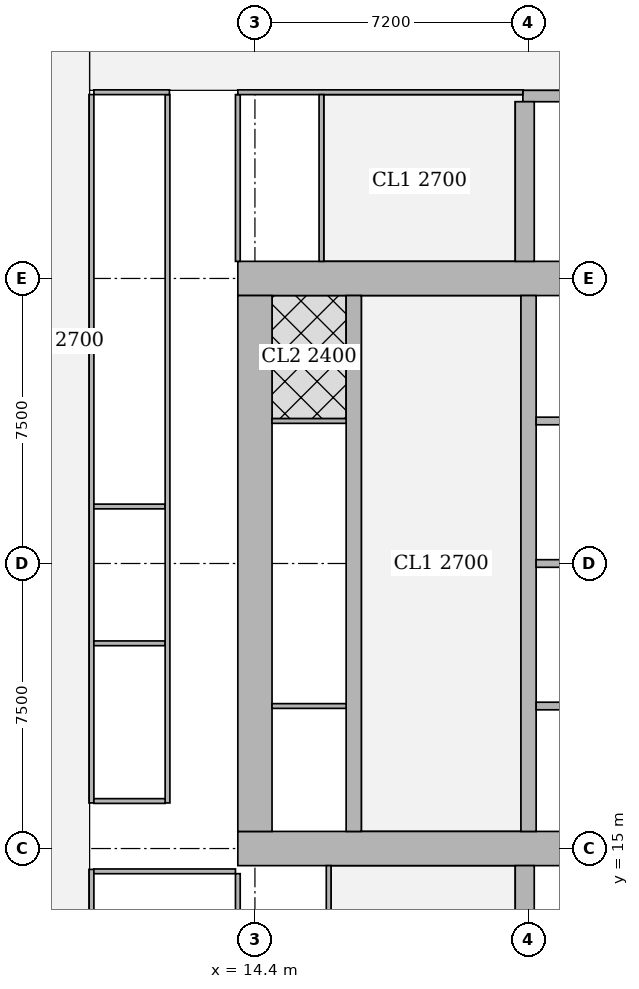
"""IFC4 building model, lengths in metres.
Left out: names, types, materials, properties, quantities, classifications, styles, units other than length and angle.
Written with IfcOpenShell. Run it as: python <this file> out.ifc"""

import sys

from ifc_helpers import new_model, si_unit, direction, frame, frame_2d, origin, place, context, subcontext, project, spatial, rectangle, extrude, element, fill, save


model = new_model("IFC4")
c1 = context("Model", 3, precision=1e-05, world=origin(), true_north=direction((0.0, 1.0)))
c2 = subcontext(c1, "Body", "Model", "MODEL_VIEW")
j1 = project(units=[si_unit("LENGTHUNIT", "METRE"), si_unit("PLANEANGLEUNIT", "RADIAN")], contexts=[c1])
p1 = place(None, origin())
s1 = spatial("IfcSite", under=j1, at=p1, CompositionType="ELEMENT")
p2 = place(p1, origin())
s2 = spatial("IfcBuilding", under=s1, at=p2, CompositionType="ELEMENT")
p3 = place(p2, frame((0.0, 0.0, 147.05)))
s3 = spatial("IfcBuildingStorey", under=s2, at=p3, CompositionType="ELEMENT", Elevation=147.05)
p4 = place(p3, frame((13.95, 15.0, 0.0), z_axis=(0.0, 0.0, 1.0), x_axis=(1.0, 0.0, 0.0)))
e1 = element("IfcWall", 1, at=p4, inside=s3, PredefinedType="SHEAR", context=c2, shape_type="SweptSolid", body=[
    extrude(rectangle(XDim=15.3, YDim=0.9, at=frame_2d((7.65, 0.0))), origin(), (0.0, 0.0, 1.0), 3.75),
])
p5 = place(p4, frame((4.45, 0.0, 0.0)))
e2 = element("IfcOpeningElement", 2, at=p5, cuts=e1, PredefinedType="OPENING", context=c2, shape_type="SweptSolid", body=[
    extrude(rectangle(XDim=1.8, YDim=2.1, at=frame_2d((0.9, 1.05))), frame((0.0, 0.46, 0.0), z_axis=(0.0, -1.0, 0.0), x_axis=(1.0, 0.0, 0.0)), (0.0, 0.0, 1.0), 0.92),
])
p6 = place(p4, frame((10.7, 0.0, 0.0)))
e3 = element("IfcOpeningElement", 3, at=p6, cuts=e1, PredefinedType="OPENING", context=c2, shape_type="SweptSolid", body=[
    extrude(rectangle(XDim=1.1, YDim=2.1, at=frame_2d((0.55, 1.05))), frame((0.0, 0.46, 0.0), z_axis=(0.0, -1.0, 0.0), x_axis=(1.0, 0.0, 0.0)), (0.0, 0.0, 1.0), 0.92),
])
p7 = place(p3, frame((13.95, 30.0, 0.0), z_axis=(0.0, 0.0, 1.0), x_axis=(1.0, 0.0, 0.0)))
e4 = element("IfcWall", 4, at=p7, inside=s3, PredefinedType="SHEAR", context=c2, shape_type="SweptSolid", body=[
    extrude(rectangle(XDim=15.3, YDim=0.9, at=frame_2d((7.65, 0.0))), origin(), (0.0, 0.0, 1.0), 3.75),
])
p8 = place(p7, frame((4.45, 0.0, 0.0)))
e5 = element("IfcOpeningElement", 5, at=p8, cuts=e4, PredefinedType="OPENING", context=c2, shape_type="SweptSolid", body=[
    extrude(rectangle(XDim=1.8, YDim=2.1, at=frame_2d((0.9, 1.05))), frame((0.0, 0.46, 0.0), z_axis=(0.0, -1.0, 0.0), x_axis=(1.0, 0.0, 0.0)), (0.0, 0.0, 1.0), 0.92),
])
p9 = place(p7, frame((10.7, 0.0, 0.0)))
e6 = element("IfcOpeningElement", 6, at=p9, cuts=e4, PredefinedType="OPENING", context=c2, shape_type="SweptSolid", body=[
    extrude(rectangle(XDim=1.1, YDim=2.1, at=frame_2d((0.55, 1.05))), frame((0.0, 0.46, 0.0), z_axis=(0.0, -1.0, 0.0), x_axis=(1.0, 0.0, 0.0)), (0.0, 0.0, 1.0), 0.92),
])
p10 = place(p3, frame((14.4, 15.45, 0.0), z_axis=(0.0, 0.0, 1.0), x_axis=(0.0, 1.0, 0.0)))
e7 = element("IfcWall", 7, at=p10, inside=s3, PredefinedType="SHEAR", context=c2, shape_type="SweptSolid", body=[
    extrude(rectangle(XDim=14.1, YDim=0.9, at=frame_2d((7.05, 0.0))), origin(), (0.0, 0.0, 1.0), 3.75),
])
p11 = place(p3, frame((17.0, 15.45, 0.0), z_axis=(0.0, 0.0, 1.0), x_axis=(0.0, 1.0, 0.0)))
e8 = element("IfcWall", 8, at=p11, inside=s3, PredefinedType="SHEAR", context=c2, shape_type="SweptSolid", body=[
    extrude(rectangle(XDim=14.1, YDim=0.4, at=frame_2d((7.05, 0.0))), origin(), (0.0, 0.0, 1.0), 3.75),
])
p12 = place(p11, frame((0.925, 0.0, 0.0)))
e9 = element("IfcOpeningElement", 9, at=p12, cuts=e8, PredefinedType="OPENING", context=c2, shape_type="SweptSolid", body=[
    extrude(rectangle(XDim=1.0, YDim=2.1, at=frame_2d((0.5, 1.05))), frame((0.0, 0.21, 0.0), z_axis=(0.0, -1.0, 0.0), x_axis=(1.0, 0.0, 0.0)), (0.0, 0.0, 1.0), 0.42),
])
p13 = place(p11, frame((4.675, 0.0, 0.0)))
e10 = element("IfcOpeningElement", 10, at=p13, cuts=e8, PredefinedType="OPENING", context=c2, shape_type="SweptSolid", body=[
    extrude(rectangle(XDim=1.0, YDim=2.1, at=frame_2d((0.5, 1.05))), frame((0.0, 0.21, 0.0), z_axis=(0.0, -1.0, 0.0), x_axis=(1.0, 0.0, 0.0)), (0.0, 0.0, 1.0), 0.42),
])
p14 = place(p11, frame((8.425, 0.0, 0.0)))
e11 = element("IfcOpeningElement", 11, at=p14, cuts=e8, PredefinedType="OPENING", context=c2, shape_type="SweptSolid", body=[
    extrude(rectangle(XDim=1.0, YDim=2.1, at=frame_2d((0.5, 1.05))), frame((0.0, 0.21, 0.0), z_axis=(0.0, -1.0, 0.0), x_axis=(1.0, 0.0, 0.0)), (0.0, 0.0, 1.0), 0.42),
])
p15 = place(p11, frame((12.175, 0.0, 0.0)))
e12 = element("IfcOpeningElement", 12, at=p15, cuts=e8, PredefinedType="OPENING", context=c2, shape_type="SweptSolid", body=[
    extrude(rectangle(XDim=1.0, YDim=2.1, at=frame_2d((0.5, 1.05))), frame((0.0, 0.21, 0.0), z_axis=(0.0, -1.0, 0.0), x_axis=(1.0, 0.0, 0.0)), (0.0, 0.0, 1.0), 0.42),
])
p16 = place(p3, frame((21.6, 15.45, 0.0), z_axis=(0.0, 0.0, 1.0), x_axis=(0.0, 1.0, 0.0)))
e13 = element("IfcWall", 13, at=p16, inside=s3, PredefinedType="SHEAR", context=c2, shape_type="SweptSolid", body=[
    extrude(rectangle(XDim=14.1, YDim=0.4, at=frame_2d((7.05, 0.0))), origin(), (0.0, 0.0, 1.0), 3.75),
])
p17 = place(p16, frame((0.875, 0.0, 0.0)))
e14 = element("IfcOpeningElement", 14, at=p17, cuts=e13, PredefinedType="OPENING", context=c2, shape_type="SweptSolid", body=[
    extrude(rectangle(XDim=1.1, YDim=2.1, at=frame_2d((0.55, 1.05))), frame((0.0, 0.21, 0.0), z_axis=(0.0, -1.0, 0.0), x_axis=(1.0, 0.0, 0.0)), (0.0, 0.0, 1.0), 0.42),
])
p18 = place(p16, frame((4.625, 0.0, 0.0)))
e15 = element("IfcOpeningElement", 15, at=p18, cuts=e13, PredefinedType="OPENING", context=c2, shape_type="SweptSolid", body=[
    extrude(rectangle(XDim=1.1, YDim=2.1, at=frame_2d((0.55, 1.05))), frame((0.0, 0.21, 0.0), z_axis=(0.0, -1.0, 0.0), x_axis=(1.0, 0.0, 0.0)), (0.0, 0.0, 1.0), 0.42),
])
p19 = place(p16, frame((8.375, 0.0, 0.0)))
e16 = element("IfcOpeningElement", 16, at=p19, cuts=e13, PredefinedType="OPENING", context=c2, shape_type="SweptSolid", body=[
    extrude(rectangle(XDim=1.1, YDim=2.1, at=frame_2d((0.55, 1.05))), frame((0.0, 0.21, 0.0), z_axis=(0.0, -1.0, 0.0), x_axis=(1.0, 0.0, 0.0)), (0.0, 0.0, 1.0), 0.42),
])
p20 = place(p16, frame((12.125, 0.0, 0.0)))
e17 = element("IfcOpeningElement", 17, at=p20, cuts=e13, PredefinedType="OPENING", context=c2, shape_type="SweptSolid", body=[
    extrude(rectangle(XDim=1.1, YDim=2.1, at=frame_2d((0.55, 1.05))), frame((0.0, 0.21, 0.0), z_axis=(0.0, -1.0, 0.0), x_axis=(1.0, 0.0, 0.0)), (0.0, 0.0, 1.0), 0.42),
])
p21 = place(p3, frame((21.5, 10.35, 0.0), z_axis=(0.0, 0.0, 1.0), x_axis=(0.0, 1.0, 0.0)))
e18 = element("IfcWall", 18, at=p21, inside=s3, PredefinedType="SHEAR", context=c2, shape_type="SweptSolid", body=[
    extrude(rectangle(XDim=4.2, YDim=0.5, at=frame_2d((2.1, 0.0))), origin(), (0.0, 0.0, 1.0), 3.75),
])
p22 = place(p3, frame((21.45, 34.8, 0.0), z_axis=(0.0, 0.0, 1.0), x_axis=(1.0, 0.0, 0.0)))
e19 = element("IfcWall", 19, at=p22, inside=s3, PredefinedType="SHEAR", context=c2, shape_type="SweptSolid", body=[
    extrude(rectangle(XDim=7.5, YDim=0.3, at=frame_2d((3.75, 0.0))), origin(), (0.0, 0.0, 1.0), 3.75),
])
p23 = place(p22, frame((0.5, 0.0, 0.0)))
e20 = element("IfcOpeningElement", 20, at=p23, cuts=e19, PredefinedType="OPENING", context=c2, shape_type="SweptSolid", body=[
    extrude(rectangle(XDim=1.1, YDim=2.1, at=frame_2d((0.55, 1.05))), frame((0.0, 0.16, 0.0), z_axis=(0.0, -1.0, 0.0), x_axis=(1.0, 0.0, 0.0)), (0.0, 0.0, 1.0), 0.32),
])
p24 = place(p3, frame((21.5, 30.45, 0.0), z_axis=(0.0, 0.0, 1.0), x_axis=(0.0, 1.0, 0.0)))
e21 = element("IfcWall", 21, at=p24, inside=s3, PredefinedType="SHEAR", context=c2, shape_type="SweptSolid", body=[
    extrude(rectangle(XDim=4.2, YDim=0.5, at=frame_2d((2.1, 0.0))), origin(), (0.0, 0.0, 1.0), 3.75),
])
p25 = place(p3, frame((10.1, 10.162, 0.0), z_axis=(0.0, 0.0, 1.0), x_axis=(0.0, 1.0, 0.0)))
e22 = element("IfcWall", 22, at=p25, inside=s3, PredefinedType="PARTITIONING", context=c2, shape_type="SweptSolid", body=[
    extrude(rectangle(XDim=4.288, YDim=0.125, at=frame_2d((2.144, 0.0))), origin(), (0.0, 0.0, 1.0), 3.5),
])
p26 = place(p25, frame((1.563, 0.0, 0.0)))
e23 = element("IfcOpeningElement", 23, at=p26, cuts=e22, PredefinedType="OPENING", context=c2, shape_type="SweptSolid", body=[
    extrude(rectangle(XDim=1.0, YDim=2.1, at=frame_2d((0.5, 1.05))), frame((0.0, 0.073, 0.0), z_axis=(0.0, -1.0, 0.0), x_axis=(1.0, 0.0, 0.0)), (0.0, 0.0, 1.0), 0.145),
])
p27 = place(p3, frame((10.1, 16.2, 0.0), z_axis=(0.0, 0.0, 1.0), x_axis=(0.0, 1.0, 0.0)))
e24 = element("IfcWall", 24, at=p27, inside=s3, PredefinedType="PARTITIONING", context=c2, shape_type="SweptSolid", body=[
    extrude(rectangle(XDim=18.638, YDim=0.125, at=frame_2d((9.319, 0.0))), origin(), (0.0, 0.0, 1.0), 3.5),
])
p28 = place(p27, frame((1.6, 0.0, 0.0)))
e25 = element("IfcOpeningElement", 25, at=p28, cuts=e24, PredefinedType="OPENING", context=c2, shape_type="SweptSolid", body=[
    extrude(rectangle(XDim=1.0, YDim=2.1, at=frame_2d((0.5, 1.05))), frame((0.0, 0.073, 0.0), z_axis=(0.0, -1.0, 0.0), x_axis=(1.0, 0.0, 0.0)), (0.0, 0.0, 1.0), 0.145),
])
p29 = place(p27, frame((5.5, 0.0, 0.0)))
e26 = element("IfcOpeningElement", 26, at=p29, cuts=e24, PredefinedType="OPENING", context=c2, shape_type="SweptSolid", body=[
    extrude(rectangle(XDim=1.0, YDim=2.1, at=frame_2d((0.5, 1.05))), frame((0.0, 0.073, 0.0), z_axis=(0.0, -1.0, 0.0), x_axis=(1.0, 0.0, 0.0)), (0.0, 0.0, 1.0), 0.145),
])
p30 = place(p27, frame((12.775, 0.0, 0.0)))
e27 = element("IfcOpeningElement", 27, at=p30, cuts=e24, PredefinedType="OPENING", context=c2, shape_type="SweptSolid", body=[
    extrude(rectangle(XDim=1.0, YDim=2.1, at=frame_2d((0.5, 1.05))), frame((0.0, 0.073, 0.0), z_axis=(0.0, -1.0, 0.0), x_axis=(1.0, 0.0, 0.0)), (0.0, 0.0, 1.0), 0.145),
])
p31 = place(p3, frame((10.162, 14.4, 0.0), z_axis=(0.0, 0.0, 1.0), x_axis=(1.0, 0.0, 0.0)))
e28 = element("IfcWall", 28, at=p31, inside=s3, PredefinedType="PARTITIONING", context=c2, shape_type="SweptSolid", body=[
    extrude(rectangle(XDim=3.726, YDim=0.125, at=frame_2d((1.863, 0.0))), origin(), (0.0, 0.0, 1.0), 3.5),
])
for number, where, z_axis, x_axis in (
    (29, (10.162, 20.4, 0.0), (0.0, 0.0, 1.0), (1.0, 0.0, 0.0)),
    (30, (10.162, 24.0, 0.0), (0.0, 0.0, 1.0), (1.0, 0.0, 0.0)),
):
    element("IfcWall", number, at=place(p3, frame(where, z_axis=z_axis, x_axis=x_axis)), inside=s3, PredefinedType="PARTITIONING", context=c2, shape_type="SweptSolid", body=[
        extrude(rectangle(XDim=1.875, YDim=0.125, at=frame_2d((0.938, 0.0))), origin(), (0.0, 0.0, 1.0), 3.5),
    ])
p32 = place(p3, frame((12.1, 16.2, 0.0), z_axis=(0.0, 0.0, 1.0), x_axis=(0.0, 1.0, 0.0)))
e31 = element("IfcWall", 31, at=p32, inside=s3, PredefinedType="PARTITIONING", context=c2, shape_type="SweptSolid", body=[
    extrude(rectangle(XDim=18.637, YDim=0.125, at=frame_2d((9.318, 0.0))), origin(), (0.0, 0.0, 1.0), 3.5),
])
p33 = place(p3, frame((10.162, 16.25, 0.0), z_axis=(0.0, 0.0, 1.0), x_axis=(1.0, 0.0, 0.0)))
e32 = element("IfcWall", 32, at=p33, inside=s3, PredefinedType="PARTITIONING", context=c2, shape_type="SweptSolid", body=[
    extrude(rectangle(XDim=1.875, YDim=0.125, at=frame_2d((0.938, 0.0))), origin(), (0.0, 0.0, 1.0), 3.5),
])
p34 = place(p3, frame((13.95, 10.163, 0.0), z_axis=(0.0, 0.0, 1.0), x_axis=(0.0, 1.0, 0.0)))
e33 = element("IfcWall", 33, at=p34, inside=s3, PredefinedType="PARTITIONING", context=c2, shape_type="SweptSolid", body=[
    extrude(rectangle(XDim=4.175, YDim=0.125, at=frame_2d((2.087, 0.0))), origin(), (0.0, 0.0, 1.0), 3.5),
])
p35 = place(p3, frame((13.95, 30.45, 0.0), z_axis=(0.0, 0.0, 1.0), x_axis=(0.0, 1.0, 0.0)))
e34 = element("IfcWall", 34, at=p35, inside=s3, PredefinedType="PARTITIONING", context=c2, shape_type="SweptSolid", body=[
    extrude(rectangle(XDim=4.387, YDim=0.125, at=frame_2d((2.193, 0.0))), origin(), (0.0, 0.0, 1.0), 3.5),
])
p36 = place(p3, frame((10.162, 34.9, 0.0), z_axis=(0.0, 0.0, 1.0), x_axis=(1.0, 0.0, 0.0)))
e35 = element("IfcWall", 35, at=p36, inside=s3, PredefinedType="PARTITIONING", context=c2, shape_type="SweptSolid", body=[
    extrude(rectangle(XDim=1.988, YDim=0.125, at=frame_2d((0.994, 0.0))), origin(), (0.0, 0.0, 1.0), 3.5),
])
p37 = place(p3, frame((13.95, 34.9, 0.0), z_axis=(0.0, 0.0, 1.0), x_axis=(1.0, 0.0, 0.0)))
e36 = element("IfcWall", 36, at=p37, inside=s3, PredefinedType="PARTITIONING", context=c2, shape_type="SweptSolid", body=[
    extrude(rectangle(XDim=7.5, YDim=0.125, at=frame_2d((3.75, 0.0))), origin(), (0.0, 0.0, 1.0), 3.5),
])
p38 = place(p37, frame((3.95, 0.0, 0.0)))
e37 = element("IfcOpeningElement", 37, at=p38, cuts=e36, PredefinedType="OPENING", context=c2, shape_type="SweptSolid", body=[
    extrude(rectangle(XDim=1.8, YDim=2.1, at=frame_2d((0.9, 1.05))), frame((0.0, 0.073, 0.0), z_axis=(0.0, -1.0, 0.0), x_axis=(1.0, 0.0, 0.0)), (0.0, 0.0, 1.0), 0.145),
])
p39 = place(p3, frame((16.34, 10.163, 0.0), z_axis=(0.0, 0.0, 1.0), x_axis=(0.0, 1.0, 0.0)))
e38 = element("IfcWall", 38, at=p39, inside=s3, PredefinedType="PARTITIONING", context=c2, shape_type="SweptSolid", body=[
    extrude(rectangle(XDim=4.387, YDim=0.125, at=frame_2d((2.193, 0.0))), origin(), (0.0, 0.0, 1.0), 3.5),
])
p40 = place(p39, frame((1.637, 0.0, 0.0)))
e39 = element("IfcOpeningElement", 39, at=p40, cuts=e38, PredefinedType="OPENING", context=c2, shape_type="SweptSolid", body=[
    extrude(rectangle(XDim=1.0, YDim=2.1, at=frame_2d((0.5, 1.05))), frame((0.0, 0.073, 0.0), z_axis=(0.0, -1.0, 0.0), x_axis=(1.0, 0.0, 0.0)), (0.0, 0.0, 1.0), 0.145),
])
p41 = place(p3, frame((16.15, 30.45, 0.0), z_axis=(0.0, 0.0, 1.0), x_axis=(0.0, 1.0, 0.0)))
e40 = element("IfcWall", 40, at=p41, inside=s3, PredefinedType="PARTITIONING", context=c2, shape_type="SweptSolid", body=[
    extrude(rectangle(XDim=4.387, YDim=0.125, at=frame_2d((2.193, 0.0))), origin(), (0.0, 0.0, 1.0), 3.5),
])
p42 = place(p41, frame((1.75, 0.0, 0.0)))
e41 = element("IfcOpeningElement", 41, at=p42, cuts=e40, PredefinedType="OPENING", context=c2, shape_type="SweptSolid", body=[
    extrude(rectangle(XDim=1.0, YDim=2.1, at=frame_2d((0.5, 1.05))), frame((0.0, 0.073, 0.0), z_axis=(0.0, -1.0, 0.0), x_axis=(1.0, 0.0, 0.0)), (0.0, 0.0, 1.0), 0.145),
])
for number, where, z_axis, x_axis in (
    (42, (14.85, 18.75, 0.0), (0.0, 0.0, 1.0), (1.0, 0.0, 0.0)),
    (43, (14.85, 26.25, 0.0), (0.0, 0.0, 1.0), (1.0, 0.0, 0.0)),
):
    element("IfcWall", number, at=place(p3, frame(where, z_axis=z_axis, x_axis=x_axis)), inside=s3, PredefinedType="PARTITIONING", context=c2, shape_type="SweptSolid", body=[
        extrude(rectangle(XDim=1.95, YDim=0.125, at=frame_2d((0.975, 0.0))), origin(), (0.0, 0.0, 1.0), 3.5),
    ])
for number, where, z_axis, x_axis in (
    (44, (21.8, 18.75, 0.0), (0.0, 0.0, 1.0), (1.0, 0.0, 0.0)),
    (45, (21.8, 22.5, 0.0), (0.0, 0.0, 1.0), (1.0, 0.0, 0.0)),
    (46, (21.8, 26.25, 0.0), (0.0, 0.0, 1.0), (1.0, 0.0, 0.0)),
):
    element("IfcWall", number, at=place(p3, frame(where, z_axis=z_axis, x_axis=x_axis)), inside=s3, PredefinedType="SOLIDWALL", context=c2, shape_type="SweptSolid", body=[
        extrude(rectangle(XDim=2.2, YDim=0.2, at=frame_2d((1.1, 0.0))), origin(), (0.0, 0.0, 1.0), 3.5),
    ])
p43 = place(p28, origin())
e47 = element("IfcDoor", 47, at=p43, inside=s3, OperationType="SINGLE_SWING_RIGHT", PredefinedType="DOOR", context=c2, shape_type="SweptSolid", body=[
    extrude(rectangle(XDim=1.0, YDim=2.1, at=frame_2d((0.5, 1.05))), frame((0.0, 0.025, 0.0), z_axis=(0.0, -1.0, 0.0), x_axis=(1.0, 0.0, 0.0)), (0.0, 0.0, 1.0), 0.05),
])
fill(e25, e47)
p44 = place(p29, origin())
e48 = element("IfcDoor", 48, at=p44, inside=s3, OperationType="SINGLE_SWING_RIGHT", PredefinedType="DOOR", context=c2, shape_type="SweptSolid", body=[
    extrude(rectangle(XDim=1.0, YDim=2.1, at=frame_2d((0.5, 1.05))), frame((0.0, 0.025, 0.0), z_axis=(0.0, -1.0, 0.0), x_axis=(1.0, 0.0, 0.0)), (0.0, 0.0, 1.0), 0.05),
])
fill(e26, e48)
p45 = place(p30, origin())
e49 = element("IfcDoor", 49, at=p45, inside=s3, OperationType="SINGLE_SWING_LEFT", PredefinedType="DOOR", context=c2, shape_type="SweptSolid", body=[
    extrude(rectangle(XDim=1.0, YDim=2.1, at=frame_2d((0.5, 1.05))), frame((0.0, 0.025, 0.0), z_axis=(0.0, -1.0, 0.0), x_axis=(1.0, 0.0, 0.0)), (0.0, 0.0, 1.0), 0.05),
])
fill(e27, e49)
p46 = place(p42, origin())
e50 = element("IfcDoor", 50, at=p46, inside=s3, OperationType="SINGLE_SWING_RIGHT", PredefinedType="DOOR", context=c2, shape_type="SweptSolid", body=[
    extrude(rectangle(XDim=1.0, YDim=2.1, at=frame_2d((0.5, 1.05))), frame((0.0, 0.025, 0.0), z_axis=(0.0, -1.0, 0.0), x_axis=(1.0, 0.0, 0.0)), (0.0, 0.0, 1.0), 0.05),
])
fill(e41, e50)
p47 = place(p38, origin())
e51 = element("IfcDoor", 51, at=p47, inside=s3, OperationType="DOUBLE_DOOR_SINGLE_SWING", PredefinedType="DOOR", context=c2, shape_type="SweptSolid", body=[
    extrude(rectangle(XDim=1.8, YDim=2.1, at=frame_2d((0.9, 1.05))), frame((0.0, 0.025, 0.0), z_axis=(0.0, -1.0, 0.0), x_axis=(1.0, 0.0, 0.0)), (0.0, 0.0, 1.0), 0.05),
])
fill(e37, e51)
p48 = place(p12, origin())
e52 = element("IfcDoor", 52, at=p48, inside=s3, OperationType="SINGLE_SWING_LEFT", PredefinedType="DOOR", context=c2, shape_type="SweptSolid", body=[
    extrude(rectangle(XDim=1.0, YDim=2.1, at=frame_2d((0.5, 1.05))), frame((0.0, 0.025, 0.0), z_axis=(0.0, -1.0, 0.0), x_axis=(1.0, 0.0, 0.0)), (0.0, 0.0, 1.0), 0.05),
])
fill(e9, e52)
p49 = place(p13, origin())
e53 = element("IfcDoor", 53, at=p49, inside=s3, OperationType="SINGLE_SWING_LEFT", PredefinedType="DOOR", context=c2, shape_type="SweptSolid", body=[
    extrude(rectangle(XDim=1.0, YDim=2.1, at=frame_2d((0.5, 1.05))), frame((0.0, 0.025, 0.0), z_axis=(0.0, -1.0, 0.0), x_axis=(1.0, 0.0, 0.0)), (0.0, 0.0, 1.0), 0.05),
])
fill(e10, e53)
p50 = place(p14, origin())
e54 = element("IfcDoor", 54, at=p50, inside=s3, OperationType="SINGLE_SWING_RIGHT", PredefinedType="DOOR", context=c2, shape_type="SweptSolid", body=[
    extrude(rectangle(XDim=1.0, YDim=2.1, at=frame_2d((0.5, 1.05))), frame((0.0, 0.025, 0.0), z_axis=(0.0, -1.0, 0.0), x_axis=(1.0, 0.0, 0.0)), (0.0, 0.0, 1.0), 0.05),
])
fill(e11, e54)
p51 = place(p15, origin())
e55 = element("IfcDoor", 55, at=p51, inside=s3, OperationType="SINGLE_SWING_RIGHT", PredefinedType="DOOR", context=c2, shape_type="SweptSolid", body=[
    extrude(rectangle(XDim=1.0, YDim=2.1, at=frame_2d((0.5, 1.05))), frame((0.0, 0.025, 0.0), z_axis=(0.0, -1.0, 0.0), x_axis=(1.0, 0.0, 0.0)), (0.0, 0.0, 1.0), 0.05),
])
fill(e12, e55)
p52 = place(p5, origin())
e56 = element("IfcDoor", 56, at=p52, inside=s3, OperationType="DOUBLE_DOOR_SINGLE_SWING", PredefinedType="DOOR", context=c2, shape_type="SweptSolid", body=[
    extrude(rectangle(XDim=1.8, YDim=2.1, at=frame_2d((0.9, 1.05))), frame((0.0, 0.025, 0.0), z_axis=(0.0, -1.0, 0.0), x_axis=(1.0, 0.0, 0.0)), (0.0, 0.0, 1.0), 0.05),
])
fill(e2, e56)
p53 = place(p8, origin())
e57 = element("IfcDoor", 57, at=p53, inside=s3, OperationType="DOUBLE_DOOR_SINGLE_SWING", PredefinedType="DOOR", context=c2, shape_type="SweptSolid", body=[
    extrude(rectangle(XDim=1.8, YDim=2.1, at=frame_2d((0.9, 1.05))), frame((0.0, 0.025, 0.0), z_axis=(0.0, -1.0, 0.0), x_axis=(1.0, 0.0, 0.0)), (0.0, 0.0, 1.0), 0.05),
])
fill(e5, e57)
p54 = place(p17, origin())
e58 = element("IfcDoor", 58, at=p54, inside=s3, OperationType="DOUBLE_DOOR_SLIDING", PredefinedType="DOOR", context=c2, shape_type="SweptSolid", body=[
    extrude(rectangle(XDim=1.1, YDim=2.1, at=frame_2d((0.55, 1.05))), frame((0.0, 0.025, 0.0), z_axis=(0.0, -1.0, 0.0), x_axis=(1.0, 0.0, 0.0)), (0.0, 0.0, 1.0), 0.05),
])
fill(e14, e58)
p55 = place(p18, origin())
e59 = element("IfcDoor", 59, at=p55, inside=s3, OperationType="DOUBLE_DOOR_SLIDING", PredefinedType="DOOR", context=c2, shape_type="SweptSolid", body=[
    extrude(rectangle(XDim=1.1, YDim=2.1, at=frame_2d((0.55, 1.05))), frame((0.0, 0.025, 0.0), z_axis=(0.0, -1.0, 0.0), x_axis=(1.0, 0.0, 0.0)), (0.0, 0.0, 1.0), 0.05),
])
fill(e15, e59)
p56 = place(p19, origin())
e60 = element("IfcDoor", 60, at=p56, inside=s3, OperationType="DOUBLE_DOOR_SLIDING", PredefinedType="DOOR", context=c2, shape_type="SweptSolid", body=[
    extrude(rectangle(XDim=1.1, YDim=2.1, at=frame_2d((0.55, 1.05))), frame((0.0, 0.025, 0.0), z_axis=(0.0, -1.0, 0.0), x_axis=(1.0, 0.0, 0.0)), (0.0, 0.0, 1.0), 0.05),
])
fill(e16, e60)
p57 = place(p20, origin())
e61 = element("IfcDoor", 61, at=p57, inside=s3, OperationType="DOUBLE_DOOR_SLIDING", PredefinedType="DOOR", context=c2, shape_type="SweptSolid", body=[
    extrude(rectangle(XDim=1.1, YDim=2.1, at=frame_2d((0.55, 1.05))), frame((0.0, 0.025, 0.0), z_axis=(0.0, -1.0, 0.0), x_axis=(1.0, 0.0, 0.0)), (0.0, 0.0, 1.0), 0.05),
])
fill(e17, e61)
p58 = place(p23, origin())
e62 = element("IfcDoor", 62, at=p58, inside=s3, OperationType="SINGLE_SWING_RIGHT", PredefinedType="DOOR", context=c2, shape_type="SweptSolid", body=[
    extrude(rectangle(XDim=1.1, YDim=2.1, at=frame_2d((0.55, 1.05))), frame((0.0, 0.025, 0.0), z_axis=(0.0, -1.0, 0.0), x_axis=(1.0, 0.0, 0.0)), (0.0, 0.0, 1.0), 0.05),
])
fill(e20, e62)
save(model, sys.argv[1])
